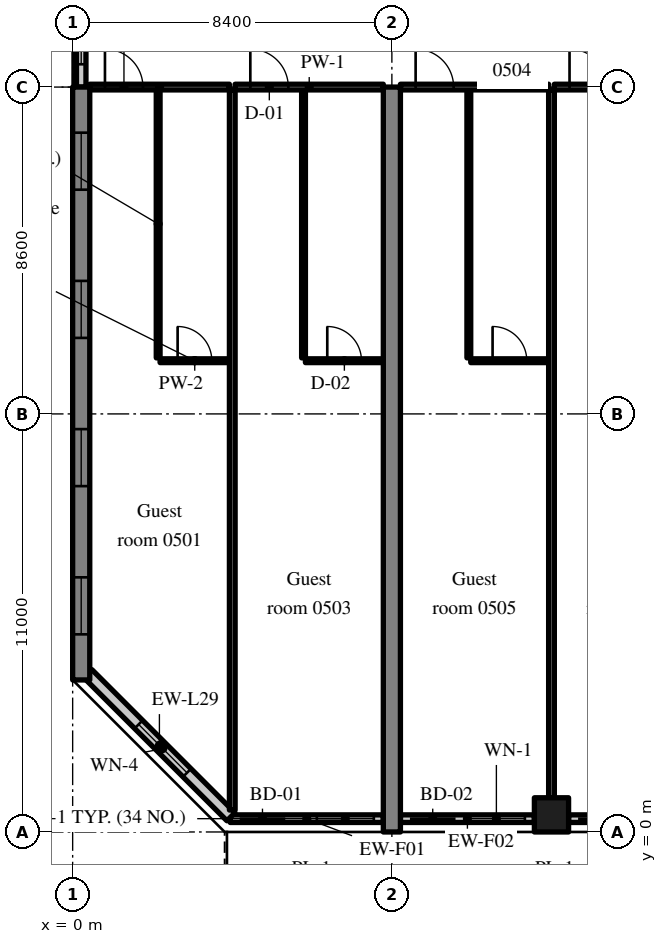
"""IFC4 building model, lengths in metres.
Left out: names, types, materials, properties, quantities, classifications, styles, units other than length and angle.
Written with IfcOpenShell. Run it as: python <this file> out.ifc"""

import sys

from ifc_helpers import new_model, si_unit, direction, frame, frame_2d, origin, origin_2d, place, context, subcontext, project, spatial, rectangle, extrude, source, transform, mapped, element, fill, save


model = new_model("IFC4")
c1 = context("Model", 3, precision=1e-05, world=origin(), true_north=direction((0.0, 1.0)))
c2 = subcontext(c1, "Body", "Model", "MODEL_VIEW")
j1 = project(units=[si_unit("LENGTHUNIT", "METRE"), si_unit("PLANEANGLEUNIT", "RADIAN")], contexts=[c1])
p1 = place(None, origin())
s1 = spatial("IfcSite", under=j1, at=p1, CompositionType="ELEMENT")
p2 = place(p1, origin())
s2 = spatial("IfcBuilding", under=s1, at=p2, CompositionType="ELEMENT")
p3 = place(p2, frame((0.0, 0.0, 27.8)))
s3 = spatial("IfcBuildingStorey", under=s2, at=p3, CompositionType="ELEMENT", Elevation=27.8)
m1 = source(origin(), c2, "Body", "SweptSolid", [
    extrude(rectangle(XDim=15.6, YDim=0.45, at=frame_2d((7.8, 0.0))), origin(), (0.0, 0.0, 1.0), 3.52),
])
p4 = place(p3, frame((0.225, 4.0, 0.0), z_axis=(0.0, 0.0, 1.0), x_axis=(0.0, 1.0, 0.0)))
e1 = element("IfcWall", 1, at=p4, inside=s3, PredefinedType="SHEAR", context=c2, shape_type="MappedRepresentation", body=[
    mapped(m1, transform((0.0, 0.0, 0.0), scale=1.0)),
])
m2 = source(origin(), c2, "Body", "SweptSolid", [
    extrude(rectangle(XDim=1.5, YDim=1.5, at=frame_2d((0.75, 0.75))), frame((0.0, 0.235, 0.0), z_axis=(0.0, -1.0, 0.0), x_axis=(1.0, 0.0, 0.0)), (0.0, 0.0, 1.0), 0.47),
])
p5 = place(p4, frame((1.2, 0.0, 0.9)))
e2 = element("IfcOpeningElement", 2, at=p5, cuts=e1, PredefinedType="OPENING", context=c2, shape_type="MappedRepresentation", body=[
    mapped(m2, transform((0.0, 0.0, 0.0), scale=1.0)),
])
p6 = place(p4, frame((5.1, 0.0, 0.9)))
e3 = element("IfcOpeningElement", 3, at=p6, cuts=e1, PredefinedType="OPENING", context=c2, shape_type="MappedRepresentation", body=[
    mapped(m2, transform((0.0, 0.0, 0.0), scale=1.0)),
])
p7 = place(p4, frame((9.0, 0.0, 0.9)))
e4 = element("IfcOpeningElement", 4, at=p7, cuts=e1, PredefinedType="OPENING", context=c2, shape_type="MappedRepresentation", body=[
    mapped(m2, transform((0.0, 0.0, 0.0), scale=1.0)),
])
p8 = place(p4, frame((12.9, 0.0, 0.9)))
e5 = element("IfcOpeningElement", 5, at=p8, cuts=e1, PredefinedType="OPENING", context=c2, shape_type="MappedRepresentation", body=[
    mapped(m2, transform((0.0, 0.0, 0.0), scale=1.0)),
])
m3 = source(origin(), c2, "Body", "SweptSolid", [
    extrude(rectangle(XDim=19.6, YDim=0.45, at=frame_2d((9.8, 0.0))), origin(), (0.0, 0.0, 1.0), 3.52),
])
p9 = place(p3, frame((8.4, 0.0, 0.0), z_axis=(0.0, 0.0, 1.0), x_axis=(0.0, 1.0, 0.0)))
e6 = element("IfcWall", 6, at=p9, inside=s3, PredefinedType="SHEAR", context=c2, shape_type="MappedRepresentation", body=[
    mapped(m3, transform((0.0, 0.0, 0.0), scale=1.0)),
])
m4 = source(origin(), c2, "Body", "SweptSolid", [
    extrude(rectangle(XDim=0.9, YDim=0.9, at=origin_2d()), origin(), (0.0, 0.0, 1.0), 3.52),
])
p10 = place(p3, frame((12.6, 0.45, 0.0), z_axis=(0.0, 0.0, 1.0), x_axis=(1.0, 0.0, 0.0)))
e7 = element("IfcColumn", 7, at=p10, inside=s3, PredefinedType="COLUMN", context=c2, shape_type="MappedRepresentation", body=[
    mapped(m4, transform((0.0, 0.0, 0.0), scale=1.0)),
])
m5 = source(origin(), c2, "Body", "SweptSolid", [
    extrude(rectangle(XDim=4.03, YDim=0.2, at=frame_2d((2.015, 0.0))), origin(), (0.0, 0.0, 1.0), 2.77),
])
p11 = place(p3, frame((4.145, 0.35, 0.0), z_axis=(0.0, 0.0, 1.0), x_axis=(1.0, 0.0, 0.0)))
e8 = element("IfcWall", 8, at=p11, inside=s3, PredefinedType="SOLIDWALL", context=c2, shape_type="MappedRepresentation", body=[
    mapped(m5, transform((0.0, 0.0, 0.0), scale=1.0)),
])
m6 = source(origin(), c2, "Body", "SweptSolid", [
    extrude(rectangle(XDim=1.2, YDim=2.4, at=frame_2d((0.6, 1.2))), frame((0.0, 0.11, 0.0), z_axis=(0.0, -1.0, 0.0), x_axis=(1.0, 0.0, 0.0)), (0.0, 0.0, 1.0), 0.22),
])
p12 = place(p11, frame((0.25, 0.0, 0.0)))
e9 = element("IfcOpeningElement", 9, at=p12, cuts=e8, PredefinedType="OPENING", context=c2, shape_type="MappedRepresentation", body=[
    mapped(m6, transform((0.0, 0.0, 0.0), scale=1.0)),
])
m7 = source(origin(), c2, "Body", "SweptSolid", [
    extrude(rectangle(XDim=1.5, YDim=1.5, at=frame_2d((0.75, 0.75))), frame((0.0, 0.11, 0.0), z_axis=(0.0, -1.0, 0.0), x_axis=(1.0, 0.0, 0.0)), (0.0, 0.0, 1.0), 0.22),
])
p13 = place(p11, frame((2.28, 0.0, 0.9)))
e10 = element("IfcOpeningElement", 10, at=p13, cuts=e8, PredefinedType="OPENING", context=c2, shape_type="MappedRepresentation", body=[
    mapped(m7, transform((0.0, 0.0, 0.0), scale=1.0)),
])
m8 = source(origin(), c2, "Body", "SweptSolid", [
    extrude(rectangle(XDim=3.525, YDim=0.2, at=frame_2d((1.762, 0.0))), origin(), (0.0, 0.0, 1.0), 2.77),
])
p14 = place(p3, frame((8.625, 0.35, 0.0), z_axis=(0.0, 0.0, 1.0), x_axis=(1.0, 0.0, 0.0)))
e11 = element("IfcWall", 11, at=p14, inside=s3, PredefinedType="SOLIDWALL", context=c2, shape_type="MappedRepresentation", body=[
    mapped(m8, transform((0.0, 0.0, 0.0), scale=1.0)),
])
p15 = place(p14, frame((0.25, 0.0, 0.0)))
e12 = element("IfcOpeningElement", 12, at=p15, cuts=e11, PredefinedType="OPENING", context=c2, shape_type="MappedRepresentation", body=[
    mapped(m6, transform((0.0, 0.0, 0.0), scale=1.0)),
])
p16 = place(p14, frame((1.775, 0.0, 0.9)))
e13 = element("IfcOpeningElement", 13, at=p16, cuts=e11, PredefinedType="OPENING", context=c2, shape_type="MappedRepresentation", body=[
    mapped(m7, transform((0.0, 0.0, 0.0), scale=1.0)),
])
p17 = place(p3, frame((13.05, 0.35, 0.0), z_axis=(0.0, 0.0, 1.0), x_axis=(1.0, 0.0, 0.0)))
e14 = element("IfcWall", 14, at=p17, inside=s3, PredefinedType="SOLIDWALL", context=c2, shape_type="MappedRepresentation", body=[
    mapped(m8, transform((0.0, 0.0, 0.0), scale=1.0)),
])
p18 = place(p17, frame((0.25, 0.0, 0.0)))
e15 = element("IfcOpeningElement", 15, at=p18, cuts=e14, PredefinedType="OPENING", context=c2, shape_type="MappedRepresentation", body=[
    mapped(m6, transform((0.0, 0.0, 0.0), scale=1.0)),
])
p19 = place(p17, frame((1.775, 0.0, 0.9)))
e16 = element("IfcOpeningElement", 16, at=p19, cuts=e14, PredefinedType="OPENING", context=c2, shape_type="MappedRepresentation", body=[
    mapped(m7, transform((0.0, 0.0, 0.0), scale=1.0)),
])
m9 = source(origin(), c2, "Body", "SweptSolid", [
    extrude(rectangle(XDim=5.326, YDim=0.3, at=frame_2d((2.663, 0.0))), origin(), (0.0, 0.0, 1.0), 3.52),
])
p20 = place(p3, frame((0.4, 4.166, 0.0), z_axis=(0.0, 0.0, 1.0), x_axis=(0.707106781187, -0.707106781187, 0.0)))
e17 = element("IfcWall", 17, at=p20, inside=s3, PredefinedType="SOLIDWALL", context=c2, shape_type="MappedRepresentation", body=[
    mapped(m9, transform((0.0, 0.0, 0.0), scale=1.0)),
])
m10 = source(origin(), c2, "Body", "SweptSolid", [
    extrude(rectangle(XDim=1.8, YDim=1.5, at=frame_2d((0.9, 0.75))), frame((0.0, 0.16, 0.0), z_axis=(0.0, -1.0, 0.0), x_axis=(1.0, 0.0, 0.0)), (0.0, 0.0, 1.0), 0.32),
])
p21 = place(p20, frame((1.889, 0.0, 0.9)))
e18 = element("IfcOpeningElement", 18, at=p21, cuts=e17, PredefinedType="OPENING", context=c2, shape_type="MappedRepresentation", body=[
    mapped(m10, transform((0.0, 0.0, 0.0), scale=1.0)),
])
m11 = source(origin(), c2, "Body", "SweptSolid", [
    extrude(rectangle(XDim=2.4, YDim=0.25, at=frame_2d((1.2, 0.0))), origin(), (0.0, 0.0, 1.0), 2.62),
])
p22 = place(p3, frame((0.225, 19.6, 0.0), z_axis=(0.0, 0.0, 1.0), x_axis=(0.0, 1.0, 0.0)))
e19 = element("IfcWall", 19, at=p22, inside=s3, PredefinedType="SOLIDWALL", context=c2, shape_type="MappedRepresentation", body=[
    mapped(m11, transform((0.0, 0.0, 0.0), scale=1.0)),
])
m12 = source(origin(), c2, "Body", "SweptSolid", [
    extrude(rectangle(XDim=1.2, YDim=1.5, at=frame_2d((0.6, 0.75))), frame((0.0, 0.135, 0.0), z_axis=(0.0, -1.0, 0.0), x_axis=(1.0, 0.0, 0.0)), (0.0, 0.0, 1.0), 0.27),
])
p23 = place(p22, frame((0.6, 0.0, 0.9)))
e20 = element("IfcOpeningElement", 20, at=p23, cuts=e19, PredefinedType="OPENING", context=c2, shape_type="MappedRepresentation", body=[
    mapped(m12, transform((0.0, 0.0, 0.0), scale=1.0)),
])
m13 = source(origin(), c2, "Body", "SweptSolid", [
    extrude(rectangle(XDim=7.05, YDim=0.1, at=frame_2d((3.525, 0.0))), origin(), (0.0, 0.0, 1.0), 3.52),
])
p24 = place(p3, frame((2.25, 12.475, 0.0), z_axis=(0.0, 0.0, 1.0), x_axis=(0.0, 1.0, 0.0)))
e21 = element("IfcWall", 21, at=p24, inside=s3, PredefinedType="PARTITIONING", context=c2, shape_type="MappedRepresentation", body=[
    mapped(m13, transform((0.0, 0.0, 0.0), scale=1.0)),
])
m14 = source(origin(), c2, "Body", "SweptSolid", [
    extrude(rectangle(XDim=1.825, YDim=0.1, at=frame_2d((0.913, 0.0))), origin(), (0.0, 0.0, 1.0), 3.52),
])
p25 = place(p3, frame((2.3, 12.4, 0.0), z_axis=(0.0, 0.0, 1.0), x_axis=(1.0, 0.0, 0.0)))
e22 = element("IfcWall", 22, at=p25, inside=s3, PredefinedType="PARTITIONING", context=c2, shape_type="MappedRepresentation", body=[
    mapped(m14, transform((0.0, 0.0, 0.0), scale=1.0)),
])
m15 = source(origin(), c2, "Body", "SweptSolid", [
    extrude(rectangle(XDim=0.9, YDim=2.1, at=frame_2d((0.45, 1.05))), frame((0.0, 0.06, 0.0), z_axis=(0.0, -1.0, 0.0), x_axis=(1.0, 0.0, 0.0)), (0.0, 0.0, 1.0), 0.12),
])
p26 = place(p25, frame((0.462, 0.0, 0.0)))
e23 = element("IfcOpeningElement", 23, at=p26, cuts=e22, PredefinedType="OPENING", context=c2, shape_type="MappedRepresentation", body=[
    mapped(m15, transform((0.0, 0.0, 0.0), scale=1.0)),
])
m16 = source(origin(), c2, "Body", "SweptSolid", [
    extrude(rectangle(XDim=3.675, YDim=0.15, at=frame_2d((1.837, 0.0))), origin(), (0.0, 0.0, 1.0), 2.82),
])
p27 = place(p3, frame((0.45, 19.6, 0.0), z_axis=(0.0, 0.0, 1.0), x_axis=(1.0, 0.0, 0.0)))
e24 = element("IfcWall", 24, at=p27, inside=s3, PredefinedType="PARTITIONING", context=c2, shape_type="MappedRepresentation", body=[
    mapped(m16, transform((0.0, 0.0, 0.0), scale=1.0)),
])
m17 = source(origin(), c2, "Body", "SweptSolid", [
    extrude(rectangle(XDim=1.0, YDim=2.1, at=frame_2d((0.5, 1.05))), frame((0.0, 0.085, 0.0), z_axis=(0.0, -1.0, 0.0), x_axis=(1.0, 0.0, 0.0)), (0.0, 0.0, 1.0), 0.17),
])
p28 = place(p27, frame((0.4, 0.0, 0.0)))
e25 = element("IfcOpeningElement", 25, at=p28, cuts=e24, PredefinedType="OPENING", context=c2, shape_type="MappedRepresentation", body=[
    mapped(m17, transform((0.0, 0.0, 0.0), scale=1.0)),
])
p29 = place(p3, frame((6.075, 12.475, 0.0), z_axis=(0.0, 0.0, 1.0), x_axis=(0.0, 1.0, 0.0)))
e26 = element("IfcWall", 26, at=p29, inside=s3, PredefinedType="PARTITIONING", context=c2, shape_type="MappedRepresentation", body=[
    mapped(m13, transform((0.0, 0.0, 0.0), scale=1.0)),
])
m18 = source(origin(), c2, "Body", "SweptSolid", [
    extrude(rectangle(XDim=2.05, YDim=0.1, at=frame_2d((1.025, 0.0))), origin(), (0.0, 0.0, 1.0), 3.52),
])
p30 = place(p3, frame((6.125, 12.4, 0.0), z_axis=(0.0, 0.0, 1.0), x_axis=(1.0, 0.0, 0.0)))
e27 = element("IfcWall", 27, at=p30, inside=s3, PredefinedType="PARTITIONING", context=c2, shape_type="MappedRepresentation", body=[
    mapped(m18, transform((0.0, 0.0, 0.0), scale=1.0)),
])
p31 = place(p30, frame((0.575, 0.0, 0.0)))
e28 = element("IfcOpeningElement", 28, at=p31, cuts=e27, PredefinedType="OPENING", context=c2, shape_type="MappedRepresentation", body=[
    mapped(m15, transform((0.0, 0.0, 0.0), scale=1.0)),
])
m19 = source(origin(), c2, "Body", "SweptSolid", [
    extrude(rectangle(XDim=3.9, YDim=0.15, at=frame_2d((1.95, 0.0))), origin(), (0.0, 0.0, 1.0), 2.82),
])
p32 = place(p3, frame((4.275, 19.6, 0.0), z_axis=(0.0, 0.0, 1.0), x_axis=(1.0, 0.0, 0.0)))
e29 = element("IfcWall", 29, at=p32, inside=s3, PredefinedType="PARTITIONING", context=c2, shape_type="MappedRepresentation", body=[
    mapped(m19, transform((0.0, 0.0, 0.0), scale=1.0)),
])
p33 = place(p32, frame((0.4, 0.0, 0.0)))
e30 = element("IfcOpeningElement", 30, at=p33, cuts=e29, PredefinedType="OPENING", context=c2, shape_type="MappedRepresentation", body=[
    mapped(m17, transform((0.0, 0.0, 0.0), scale=1.0)),
])
m20 = source(origin(), c2, "Body", "SweptSolid", [
    extrude(rectangle(XDim=18.947, YDim=0.15, at=frame_2d((9.474, 0.0))), origin(), (0.0, 0.0, 1.0), 3.52),
])
p34 = place(p3, frame((4.2, 0.578, 0.0), z_axis=(0.0, 0.0, 1.0), x_axis=(0.0, 1.0, 0.0)))
e31 = element("IfcWall", 31, at=p34, inside=s3, PredefinedType="PARTITIONING", context=c2, shape_type="MappedRepresentation", body=[
    mapped(m20, transform((0.0, 0.0, 0.0), scale=1.0)),
])
p35 = place(p3, frame((10.425, 12.475, 0.0), z_axis=(0.0, 0.0, 1.0), x_axis=(0.0, 1.0, 0.0)))
e32 = element("IfcWall", 32, at=p35, inside=s3, PredefinedType="PARTITIONING", context=c2, shape_type="MappedRepresentation", body=[
    mapped(m13, transform((0.0, 0.0, 0.0), scale=1.0)),
])
m21 = source(origin(), c2, "Body", "SweptSolid", [
    extrude(rectangle(XDim=2.05, YDim=0.1, at=frame_2d((1.025, 0.0))), origin(), (0.0, 0.0, 1.0), 3.52),
])
p36 = place(p3, frame((10.475, 12.4, 0.0), z_axis=(0.0, 0.0, 1.0), x_axis=(1.0, 0.0, 0.0)))
e33 = element("IfcWall", 33, at=p36, inside=s3, PredefinedType="PARTITIONING", context=c2, shape_type="MappedRepresentation", body=[
    mapped(m21, transform((0.0, 0.0, 0.0), scale=1.0)),
])
p37 = place(p36, frame((0.575, 0.0, 0.0)))
e34 = element("IfcOpeningElement", 34, at=p37, cuts=e33, PredefinedType="OPENING", context=c2, shape_type="MappedRepresentation", body=[
    mapped(m15, transform((0.0, 0.0, 0.0), scale=1.0)),
])
m22 = source(origin(), c2, "Body", "SweptSolid", [
    extrude(rectangle(XDim=3.9, YDim=0.15, at=frame_2d((1.95, 0.0))), origin(), (0.0, 0.0, 1.0), 2.82),
])
p38 = place(p3, frame((8.625, 19.6, 0.0), z_axis=(0.0, 0.0, 1.0), x_axis=(1.0, 0.0, 0.0)))
e35 = element("IfcWall", 35, at=p38, inside=s3, PredefinedType="PARTITIONING", context=c2, shape_type="MappedRepresentation", body=[
    mapped(m22, transform((0.0, 0.0, 0.0), scale=1.0)),
])
p39 = place(p38, frame((0.4, 0.0, 0.0)))
e36 = element("IfcOpeningElement", 36, at=p39, cuts=e35, PredefinedType="OPENING", context=c2, shape_type="MappedRepresentation", body=[
    mapped(m17, transform((0.0, 0.0, 0.0), scale=1.0)),
])
p40 = place(p3, frame((12.675, 19.6, 0.0), z_axis=(0.0, 0.0, 1.0), x_axis=(1.0, 0.0, 0.0)))
e37 = element("IfcWall", 37, at=p40, inside=s3, PredefinedType="PARTITIONING", context=c2, shape_type="MappedRepresentation", body=[
    mapped(m22, transform((0.0, 0.0, 0.0), scale=1.0)),
])
p41 = place(p40, frame((0.4, 0.0, 0.0)))
e38 = element("IfcOpeningElement", 38, at=p41, cuts=e37, PredefinedType="OPENING", context=c2, shape_type="MappedRepresentation", body=[
    mapped(m17, transform((0.0, 0.0, 0.0), scale=1.0)),
])
m23 = source(origin(), c2, "Body", "SweptSolid", [
    extrude(rectangle(XDim=18.625, YDim=0.15, at=frame_2d((9.312, 0.0))), origin(), (0.0, 0.0, 1.0), 3.52),
])
p42 = place(p3, frame((12.6, 0.9, 0.0), z_axis=(0.0, 0.0, 1.0), x_axis=(0.0, 1.0, 0.0)))
e39 = element("IfcWall", 39, at=p42, inside=s3, PredefinedType="PARTITIONING", context=c2, shape_type="MappedRepresentation", body=[
    mapped(m23, transform((0.0, 0.0, 0.0), scale=1.0)),
])
m24 = source(origin(), c2, "Body", "SweptSolid", [
    extrude(rectangle(XDim=1.2, YDim=2.4, at=frame_2d((0.6, 1.2))), frame((0.0, 0.025, 0.0), z_axis=(0.0, -1.0, 0.0), x_axis=(1.0, 0.0, 0.0)), (0.0, 0.0, 1.0), 0.05),
])
p43 = place(p12, origin())
e40 = element("IfcDoor", 40, at=p43, inside=s3, OperationType="SLIDING_TO_LEFT", PredefinedType="DOOR", context=c2, shape_type="MappedRepresentation", body=[
    mapped(m24, transform((0.0, 0.0, 0.0), scale=1.0)),
])
fill(e9, e40)
m25 = source(origin(), c2, "Body", "SweptSolid", [
    extrude(rectangle(XDim=1.5, YDim=1.5, at=frame_2d((0.75, 0.75))), frame((0.0, 0.03, 0.0), z_axis=(0.0, -1.0, 0.0), x_axis=(1.0, 0.0, 0.0)), (0.0, 0.0, 1.0), 0.06),
])
p44 = place(p13, origin())
e41 = element("IfcWindow", 41, at=p44, inside=s3, PartitioningType="SINGLE_PANEL", PredefinedType="WINDOW", context=c2, shape_type="MappedRepresentation", body=[
    mapped(m25, transform((0.0, 0.0, 0.0), scale=1.0)),
])
fill(e10, e41)
p45 = place(p15, origin())
e42 = element("IfcDoor", 42, at=p45, inside=s3, OperationType="SLIDING_TO_RIGHT", PredefinedType="DOOR", context=c2, shape_type="MappedRepresentation", body=[
    mapped(m24, transform((0.0, 0.0, 0.0), scale=1.0)),
])
fill(e12, e42)
p46 = place(p16, origin())
e43 = element("IfcWindow", 43, at=p46, inside=s3, PartitioningType="SINGLE_PANEL", PredefinedType="WINDOW", context=c2, shape_type="MappedRepresentation", body=[
    mapped(m25, transform((0.0, 0.0, 0.0), scale=1.0)),
])
fill(e13, e43)
p47 = place(p18, origin())
e44 = element("IfcDoor", 44, at=p47, inside=s3, OperationType="SLIDING_TO_LEFT", PredefinedType="DOOR", context=c2, shape_type="MappedRepresentation", body=[
    mapped(m24, transform((0.0, 0.0, 0.0), scale=1.0)),
])
fill(e15, e44)
m26 = source(origin(), c2, "Body", "SweptSolid", [
    extrude(rectangle(XDim=1.8, YDim=1.5, at=frame_2d((0.9, 0.75))), frame((0.0, 0.03, 0.0), z_axis=(0.0, -1.0, 0.0), x_axis=(1.0, 0.0, 0.0)), (0.0, 0.0, 1.0), 0.06),
])
p48 = place(p21, origin())
e45 = element("IfcWindow", 45, at=p48, inside=s3, PartitioningType="SINGLE_PANEL", PredefinedType="WINDOW", context=c2, shape_type="MappedRepresentation", body=[
    mapped(m26, transform((0.0, 0.0, 0.0), scale=1.0)),
])
fill(e18, e45)
p49 = place(p5, origin())
e46 = element("IfcWindow", 46, at=p49, inside=s3, PartitioningType="SINGLE_PANEL", PredefinedType="WINDOW", context=c2, shape_type="MappedRepresentation", body=[
    mapped(m25, transform((0.0, 0.0, 0.0), scale=1.0)),
])
fill(e2, e46)
p50 = place(p6, origin())
e47 = element("IfcWindow", 47, at=p50, inside=s3, PartitioningType="SINGLE_PANEL", PredefinedType="WINDOW", context=c2, shape_type="MappedRepresentation", body=[
    mapped(m25, transform((0.0, 0.0, 0.0), scale=1.0)),
])
fill(e3, e47)
p51 = place(p7, origin())
e48 = element("IfcWindow", 48, at=p51, inside=s3, PartitioningType="SINGLE_PANEL", PredefinedType="WINDOW", context=c2, shape_type="MappedRepresentation", body=[
    mapped(m25, transform((0.0, 0.0, 0.0), scale=1.0)),
])
fill(e4, e48)
p52 = place(p8, origin())
e49 = element("IfcWindow", 49, at=p52, inside=s3, PartitioningType="SINGLE_PANEL", PredefinedType="WINDOW", context=c2, shape_type="MappedRepresentation", body=[
    mapped(m25, transform((0.0, 0.0, 0.0), scale=1.0)),
])
fill(e5, e49)
m27 = source(origin(), c2, "Body", "SweptSolid", [
    extrude(rectangle(XDim=1.2, YDim=1.5, at=frame_2d((0.6, 0.75))), frame((0.0, 0.03, 0.0), z_axis=(0.0, -1.0, 0.0), x_axis=(1.0, 0.0, 0.0)), (0.0, 0.0, 1.0), 0.06),
])
p53 = place(p23, origin())
e50 = element("IfcWindow", 50, at=p53, inside=s3, PartitioningType="SINGLE_PANEL", PredefinedType="WINDOW", context=c2, shape_type="MappedRepresentation", body=[
    mapped(m27, transform((0.0, 0.0, 0.0), scale=1.0)),
])
fill(e20, e50)
m28 = source(origin(), c2, "Body", "SweptSolid", [
    extrude(rectangle(XDim=0.9, YDim=2.1, at=frame_2d((0.45, 1.05))), frame((0.0, 0.025, 0.0), z_axis=(0.0, -1.0, 0.0), x_axis=(1.0, 0.0, 0.0)), (0.0, 0.0, 1.0), 0.05),
])
p54 = place(p26, origin())
e51 = element("IfcDoor", 51, at=p54, inside=s3, OperationType="SINGLE_SWING_LEFT", PredefinedType="DOOR", context=c2, shape_type="MappedRepresentation", body=[
    mapped(m28, transform((0.0, 0.0, 0.0), scale=1.0)),
])
fill(e23, e51)
m29 = source(origin(), c2, "Body", "SweptSolid", [
    extrude(rectangle(XDim=1.0, YDim=2.1, at=frame_2d((0.5, 1.05))), frame((0.0, 0.025, 0.0), z_axis=(0.0, -1.0, 0.0), x_axis=(1.0, 0.0, 0.0)), (0.0, 0.0, 1.0), 0.05),
])
p55 = place(p28, origin())
e52 = element("IfcDoor", 52, at=p55, inside=s3, OperationType="SINGLE_SWING_LEFT", PredefinedType="DOOR", context=c2, shape_type="MappedRepresentation", body=[
    mapped(m29, transform((0.0, 0.0, 0.0), scale=1.0)),
])
fill(e25, e52)
p56 = place(p31, origin())
e53 = element("IfcDoor", 53, at=p56, inside=s3, OperationType="SINGLE_SWING_LEFT", PredefinedType="DOOR", context=c2, shape_type="MappedRepresentation", body=[
    mapped(m28, transform((0.0, 0.0, 0.0), scale=1.0)),
])
fill(e28, e53)
p57 = place(p33, origin())
e54 = element("IfcDoor", 54, at=p57, inside=s3, OperationType="SINGLE_SWING_LEFT", PredefinedType="DOOR", context=c2, shape_type="MappedRepresentation", body=[
    mapped(m29, transform((0.0, 0.0, 0.0), scale=1.0)),
])
fill(e30, e54)
p58 = place(p37, origin())
e55 = element("IfcDoor", 55, at=p58, inside=s3, OperationType="SINGLE_SWING_LEFT", PredefinedType="DOOR", context=c2, shape_type="MappedRepresentation", body=[
    mapped(m28, transform((0.0, 0.0, 0.0), scale=1.0)),
])
fill(e34, e55)
p59 = place(p39, origin())
e56 = element("IfcDoor", 56, at=p59, inside=s3, OperationType="SINGLE_SWING_LEFT", PredefinedType="DOOR", context=c2, shape_type="MappedRepresentation", body=[
    mapped(m29, transform((0.0, 0.0, 0.0), scale=1.0)),
])
fill(e36, e56)
p60 = place(p41, origin())
e57 = element("IfcDoor", 57, at=p60, inside=s3, OperationType="SINGLE_SWING_LEFT", PredefinedType="DOOR", context=c2, shape_type="MappedRepresentation", body=[
    mapped(m29, transform((0.0, 0.0, 0.0), scale=1.0)),
])
fill(e38, e57)
save(model, sys.argv[1])
